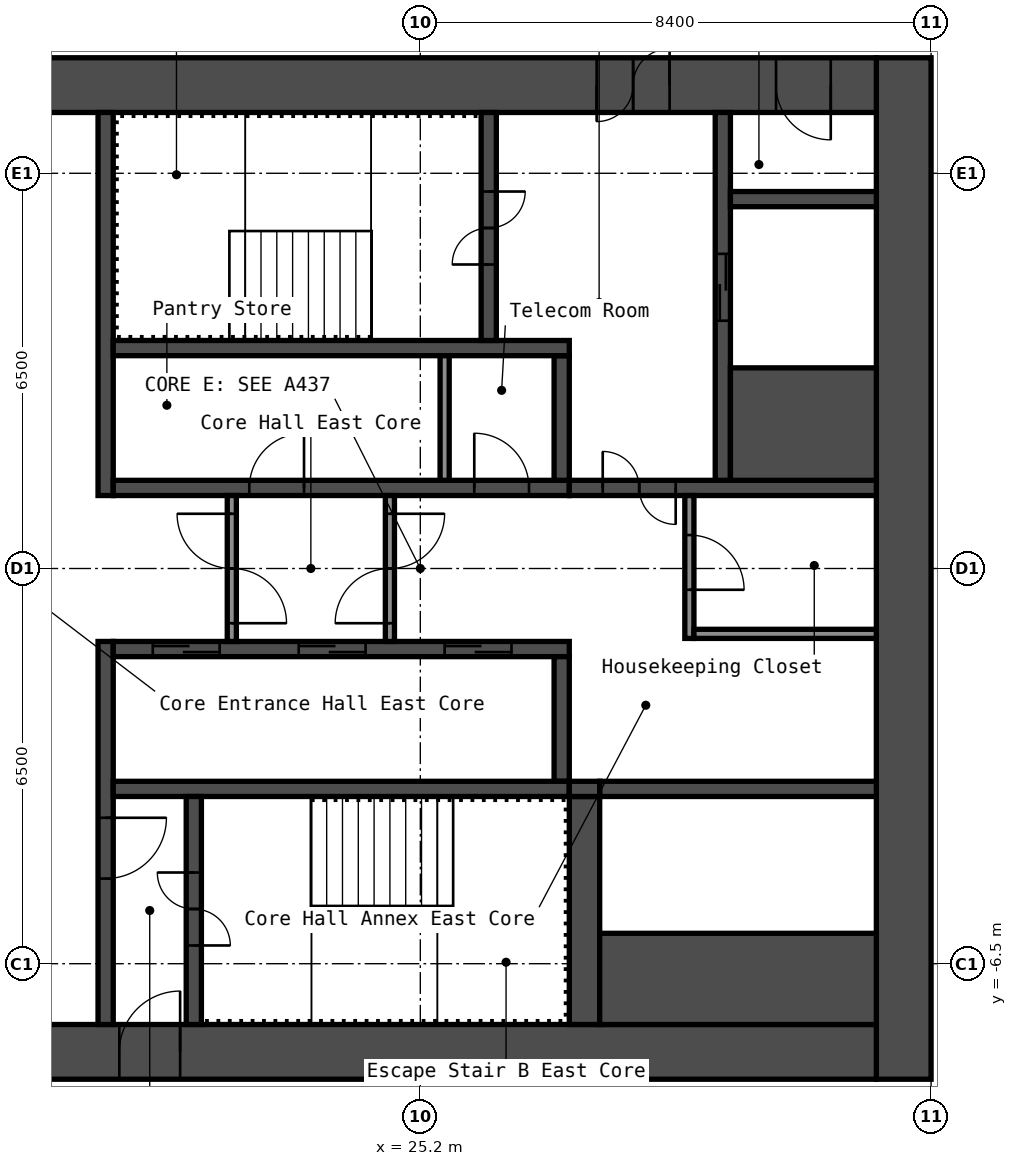
"""IFC4 building model, lengths in metres.
Left out: names, types, materials, properties, quantities, classifications, styles, units other than length and angle.
Written with IfcOpenShell. Run it as: python <this file> out.ifc"""

import sys

from ifc_helpers import new_model, si_unit, direction, frame, frame_2d, origin, place, context, subcontext, project, spatial, rectangle, extrude, element, fill, save


model = new_model("IFC4")
c1 = context("Model", 3, precision=1e-05, world=origin(), true_north=direction((0.0, 1.0)))
c2 = subcontext(c1, "Body", "Model", "MODEL_VIEW")
j1 = project(units=[si_unit("LENGTHUNIT", "METRE"), si_unit("PLANEANGLEUNIT", "RADIAN")], contexts=[c1])
p1 = place(None, origin())
s1 = spatial("IfcSite", under=j1, at=p1, CompositionType="ELEMENT")
p2 = place(p1, origin())
s2 = spatial("IfcBuilding", under=s1, at=p2, CompositionType="ELEMENT")
p3 = place(p2, frame((0.0, 0.0, 258.2)))
s3 = spatial("IfcBuildingStorey", under=s2, at=p3, CompositionType="ELEMENT", Elevation=258.2)
p4 = place(p3, frame((33.15, -8.4, 0.0), z_axis=(0.0, 0.0, 1.0), x_axis=(0.0, 1.0, 0.0)))
e1 = element("IfcWall", 1, at=p4, inside=s3, PredefinedType="SHEAR", context=c2, shape_type="SweptSolid", body=[
    extrude(rectangle(XDim=16.8, YDim=0.9, at=frame_2d((8.4, 0.0))), origin(), (0.0, 0.0, 1.0), 2.75),
])
p5 = place(p3, frame((17.7, 7.95, 0.0), z_axis=(0.0, 0.0, 1.0), x_axis=(1.0, 0.0, 0.0)))
e2 = element("IfcWall", 2, at=p5, inside=s3, PredefinedType="SHEAR", context=c2, shape_type="SweptSolid", body=[
    extrude(rectangle(XDim=15.0, YDim=0.9, at=frame_2d((7.5, 0.0))), origin(), (0.0, 0.0, 1.0), 2.75),
])
p6 = place(p5, frame((10.4, 0.0, 0.0)))
e3 = element("IfcOpeningElement", 3, at=p6, cuts=e2, PredefinedType="OPENING", context=c2, shape_type="SweptSolid", body=[
    extrude(rectangle(XDim=1.2, YDim=2.1, at=frame_2d((0.6, 1.05))), frame((0.0, 0.46, 0.0), z_axis=(0.0, -1.0, 0.0), x_axis=(1.0, 0.0, 0.0)), (0.0, 0.0, 1.0), 0.92),
])
p7 = place(p5, frame((13.35, 0.0, 0.0)))
e4 = element("IfcOpeningElement", 4, at=p7, cuts=e2, PredefinedType="OPENING", context=c2, shape_type="SweptSolid", body=[
    extrude(rectangle(XDim=0.9, YDim=2.1, at=frame_2d((0.45, 1.05))), frame((0.0, 0.46, 0.0), z_axis=(0.0, -1.0, 0.0), x_axis=(1.0, 0.0, 0.0)), (0.0, 0.0, 1.0), 0.92),
])
p8 = place(p3, frame((17.7, -7.95, 0.0), z_axis=(0.0, 0.0, 1.0), x_axis=(1.0, 0.0, 0.0)))
e5 = element("IfcWall", 5, at=p8, inside=s3, PredefinedType="SHEAR", context=c2, shape_type="SweptSolid", body=[
    extrude(rectangle(XDim=15.0, YDim=0.9, at=frame_2d((7.5, 0.0))), origin(), (0.0, 0.0, 1.0), 2.75),
])
p9 = place(p8, frame((2.55, 0.0, 0.0)))
e6 = element("IfcOpeningElement", 6, at=p9, cuts=e5, PredefinedType="OPENING", context=c2, shape_type="SweptSolid", body=[
    extrude(rectangle(XDim=1.0, YDim=2.1, at=frame_2d((0.5, 1.05))), frame((0.0, 0.46, 0.0), z_axis=(0.0, -1.0, 0.0), x_axis=(1.0, 0.0, 0.0)), (0.0, 0.0, 1.0), 0.92),
])
p10 = place(p3, frame((20.025, 1.2, 0.0), z_axis=(0.0, 0.0, 1.0), x_axis=(0.0, 1.0, 0.0)))
e7 = element("IfcWall", 7, at=p10, inside=s3, PredefinedType="SHEAR", context=c2, shape_type="SweptSolid", body=[
    extrude(rectangle(XDim=6.3, YDim=0.25, at=frame_2d((3.15, 0.0))), origin(), (0.0, 0.0, 1.0), 2.75),
])
p11 = place(p3, frame((20.025, -7.5, 0.0), z_axis=(0.0, 0.0, 1.0), x_axis=(0.0, 1.0, 0.0)))
e8 = element("IfcWall", 8, at=p11, inside=s3, PredefinedType="SHEAR", context=c2, shape_type="SweptSolid", body=[
    extrude(rectangle(XDim=6.3, YDim=0.25, at=frame_2d((3.15, 0.0))), origin(), (0.0, 0.0, 1.0), 2.75),
])
p12 = place(p11, frame((2.4, 0.0, 0.0)))
e9 = element("IfcOpeningElement", 9, at=p12, cuts=e8, PredefinedType="OPENING", context=c2, shape_type="SweptSolid", body=[
    extrude(rectangle(XDim=1.0, YDim=2.1, at=frame_2d((0.5, 1.05))), frame((0.0, 0.135, 0.0), z_axis=(0.0, -1.0, 0.0), x_axis=(1.0, 0.0, 0.0)), (0.0, 0.0, 1.0), 0.27),
])
p13 = place(p3, frame((20.15, 1.325, 0.0), z_axis=(0.0, 0.0, 1.0), x_axis=(1.0, 0.0, 0.0)))
e10 = element("IfcWall", 10, at=p13, inside=s3, PredefinedType="SHEAR", context=c2, shape_type="SweptSolid", body=[
    extrude(rectangle(XDim=7.5, YDim=0.25, at=frame_2d((3.75, 0.0))), origin(), (0.0, 0.0, 1.0), 2.75),
])
p14 = place(p13, frame((2.238, 0.0, 0.0)))
e11 = element("IfcOpeningElement", 11, at=p14, cuts=e10, PredefinedType="OPENING", context=c2, shape_type="SweptSolid", body=[
    extrude(rectangle(XDim=0.9, YDim=2.1, at=frame_2d((0.45, 1.05))), frame((0.0, 0.135, 0.0), z_axis=(0.0, -1.0, 0.0), x_axis=(1.0, 0.0, 0.0)), (0.0, 0.0, 1.0), 0.27),
])
p15 = place(p13, frame((5.938, 0.0, 0.0)))
e12 = element("IfcOpeningElement", 12, at=p15, cuts=e10, PredefinedType="OPENING", context=c2, shape_type="SweptSolid", body=[
    extrude(rectangle(XDim=0.9, YDim=2.1, at=frame_2d((0.45, 1.05))), frame((0.0, 0.135, 0.0), z_axis=(0.0, -1.0, 0.0), x_axis=(1.0, 0.0, 0.0)), (0.0, 0.0, 1.0), 0.27),
])
p16 = place(p3, frame((27.525, 1.45, 0.0), z_axis=(0.0, 0.0, 1.0), x_axis=(0.0, 1.0, 0.0)))
e13 = element("IfcWall", 13, at=p16, inside=s3, PredefinedType="SHEAR", context=c2, shape_type="SweptSolid", body=[
    extrude(rectangle(XDim=2.05, YDim=0.25, at=frame_2d((1.025, 0.0))), origin(), (0.0, 0.0, 1.0), 2.75),
])
p17 = place(p3, frame((20.15, 3.625, 0.0), z_axis=(0.0, 0.0, 1.0), x_axis=(1.0, 0.0, 0.0)))
e14 = element("IfcWall", 14, at=p17, inside=s3, PredefinedType="SHEAR", context=c2, shape_type="SweptSolid", body=[
    extrude(rectangle(XDim=7.5, YDim=0.25, at=frame_2d((3.75, 0.0))), origin(), (0.0, 0.0, 1.0), 2.75),
])
p18 = place(p3, frame((26.325, 3.75, 0.0), z_axis=(0.0, 0.0, 1.0), x_axis=(0.0, 1.0, 0.0)))
e15 = element("IfcWall", 15, at=p18, inside=s3, PredefinedType="SHEAR", context=c2, shape_type="SweptSolid", body=[
    extrude(rectangle(XDim=3.75, YDim=0.25, at=frame_2d((1.875, 0.0))), origin(), (0.0, 0.0, 1.0), 2.75),
])
p19 = place(p18, frame((1.25, 0.0, 0.0)))
e16 = element("IfcOpeningElement", 16, at=p19, cuts=e15, PredefinedType="OPENING", context=c2, shape_type="SweptSolid", body=[
    extrude(rectangle(XDim=1.2, YDim=2.1, at=frame_2d((0.6, 1.05))), frame((0.0, 0.135, 0.0), z_axis=(0.0, -1.0, 0.0), x_axis=(1.0, 0.0, 0.0)), (0.0, 0.0, 1.0), 0.27),
])
p20 = place(p3, frame((27.65, 1.325, 0.0), z_axis=(0.0, 0.0, 1.0), x_axis=(1.0, 0.0, 0.0)))
e17 = element("IfcWall", 17, at=p20, inside=s3, PredefinedType="SHEAR", context=c2, shape_type="SweptSolid", body=[
    extrude(rectangle(XDim=5.05, YDim=0.25, at=frame_2d((2.525, 0.0))), origin(), (0.0, 0.0, 1.0), 2.75),
])
p21 = place(p20, frame((0.55, 0.0, 0.0)))
e18 = element("IfcOpeningElement", 18, at=p21, cuts=e17, PredefinedType="OPENING", context=c2, shape_type="SweptSolid", body=[
    extrude(rectangle(XDim=1.2, YDim=2.1, at=frame_2d((0.6, 1.05))), frame((0.0, 0.135, 0.0), z_axis=(0.0, -1.0, 0.0), x_axis=(1.0, 0.0, 0.0)), (0.0, 0.0, 1.0), 0.27),
])
p22 = place(p3, frame((30.175, 1.45, 0.0), z_axis=(0.0, 0.0, 1.0), x_axis=(0.0, 1.0, 0.0)))
e19 = element("IfcWall", 19, at=p22, inside=s3, PredefinedType="SHEAR", context=c2, shape_type="SweptSolid", body=[
    extrude(rectangle(XDim=6.05, YDim=0.25, at=frame_2d((3.025, 0.0))), origin(), (0.0, 0.0, 1.0), 2.75),
])
p23 = place(p22, frame((2.625, 0.0, 0.0)))
e20 = element("IfcOpeningElement", 20, at=p23, cuts=e19, PredefinedType="OPENING", context=c2, shape_type="SweptSolid", body=[
    extrude(rectangle(XDim=1.1, YDim=2.1, at=frame_2d((0.55, 1.05))), frame((0.0, 0.135, 0.0), z_axis=(0.0, -1.0, 0.0), x_axis=(1.0, 0.0, 0.0)), (0.0, 0.0, 1.0), 0.27),
])
p24 = place(p3, frame((30.3, 2.375, 0.0), z_axis=(0.0, 0.0, 1.0), x_axis=(1.0, 0.0, 0.0)))
e21 = element("IfcWall", 21, at=p24, inside=s3, PredefinedType="SHEAR", context=c2, shape_type="SweptSolid", body=[
    extrude(rectangle(XDim=2.4, YDim=1.85, at=frame_2d((1.2, 0.0))), origin(), (0.0, 0.0, 1.0), 2.75),
])
p25 = place(p3, frame((30.3, 6.075, 0.0), z_axis=(0.0, 0.0, 1.0), x_axis=(1.0, 0.0, 0.0)))
e22 = element("IfcWall", 22, at=p25, inside=s3, PredefinedType="SHEAR", context=c2, shape_type="SweptSolid", body=[
    extrude(rectangle(XDim=2.4, YDim=0.25, at=frame_2d((1.2, 0.0))), origin(), (0.0, 0.0, 1.0), 2.75),
])
p26 = place(p3, frame((20.15, -1.325, 0.0), z_axis=(0.0, 0.0, 1.0), x_axis=(1.0, 0.0, 0.0)))
e23 = element("IfcWall", 23, at=p26, inside=s3, PredefinedType="SHEAR", context=c2, shape_type="SweptSolid", body=[
    extrude(rectangle(XDim=7.5, YDim=0.25, at=frame_2d((3.75, 0.0))), origin(), (0.0, 0.0, 1.0), 2.75),
])
p27 = place(p26, frame((0.65, 0.0, 0.0)))
e24 = element("IfcOpeningElement", 24, at=p27, cuts=e23, PredefinedType="OPENING", context=c2, shape_type="SweptSolid", body=[
    extrude(rectangle(XDim=1.1, YDim=2.1, at=frame_2d((0.55, 1.05))), frame((0.0, 0.135, 0.0), z_axis=(0.0, -1.0, 0.0), x_axis=(1.0, 0.0, 0.0)), (0.0, 0.0, 1.0), 0.27),
])
p28 = place(p26, frame((3.05, 0.0, 0.0)))
e25 = element("IfcOpeningElement", 25, at=p28, cuts=e23, PredefinedType="OPENING", context=c2, shape_type="SweptSolid", body=[
    extrude(rectangle(XDim=1.1, YDim=2.1, at=frame_2d((0.55, 1.05))), frame((0.0, 0.135, 0.0), z_axis=(0.0, -1.0, 0.0), x_axis=(1.0, 0.0, 0.0)), (0.0, 0.0, 1.0), 0.27),
])
p29 = place(p26, frame((5.45, 0.0, 0.0)))
e26 = element("IfcOpeningElement", 26, at=p29, cuts=e23, PredefinedType="OPENING", context=c2, shape_type="SweptSolid", body=[
    extrude(rectangle(XDim=1.1, YDim=2.1, at=frame_2d((0.55, 1.05))), frame((0.0, 0.135, 0.0), z_axis=(0.0, -1.0, 0.0), x_axis=(1.0, 0.0, 0.0)), (0.0, 0.0, 1.0), 0.27),
])
p30 = place(p3, frame((27.525, -3.5, 0.0), z_axis=(0.0, 0.0, 1.0), x_axis=(0.0, 1.0, 0.0)))
e27 = element("IfcWall", 27, at=p30, inside=s3, PredefinedType="SHEAR", context=c2, shape_type="SweptSolid", body=[
    extrude(rectangle(XDim=2.05, YDim=0.25, at=frame_2d((1.025, 0.0))), origin(), (0.0, 0.0, 1.0), 2.75),
])
p31 = place(p3, frame((20.15, -3.625, 0.0), z_axis=(0.0, 0.0, 1.0), x_axis=(1.0, 0.0, 0.0)))
e28 = element("IfcWall", 28, at=p31, inside=s3, PredefinedType="SHEAR", context=c2, shape_type="SweptSolid", body=[
    extrude(rectangle(XDim=7.5, YDim=0.25, at=frame_2d((3.75, 0.0))), origin(), (0.0, 0.0, 1.0), 2.75),
])
p32 = place(p3, frame((21.475, -7.5, 0.0), z_axis=(0.0, 0.0, 1.0), x_axis=(0.0, 1.0, 0.0)))
e29 = element("IfcWall", 29, at=p32, inside=s3, PredefinedType="SHEAR", context=c2, shape_type="SweptSolid", body=[
    extrude(rectangle(XDim=3.75, YDim=0.25, at=frame_2d((1.875, 0.0))), origin(), (0.0, 0.0, 1.0), 2.75),
])
p33 = place(p32, frame((1.3, 0.0, 0.0)))
e30 = element("IfcOpeningElement", 30, at=p33, cuts=e29, PredefinedType="OPENING", context=c2, shape_type="SweptSolid", body=[
    extrude(rectangle(XDim=1.2, YDim=2.1, at=frame_2d((0.6, 1.05))), frame((0.0, 0.135, 0.0), z_axis=(0.0, -1.0, 0.0), x_axis=(1.0, 0.0, 0.0)), (0.0, 0.0, 1.0), 0.27),
])
p34 = place(p3, frame((27.9, -7.5, 0.0), z_axis=(0.0, 0.0, 1.0), x_axis=(0.0, 1.0, 0.0)))
e31 = element("IfcWall", 31, at=p34, inside=s3, PredefinedType="SHEAR", context=c2, shape_type="SweptSolid", body=[
    extrude(rectangle(XDim=3.75, YDim=0.5, at=frame_2d((1.875, 0.0))), origin(), (0.0, 0.0, 1.0), 2.75),
])
p35 = place(p3, frame((28.15, -3.625, 0.0), z_axis=(0.0, 0.0, 1.0), x_axis=(1.0, 0.0, 0.0)))
e32 = element("IfcWall", 32, at=p35, inside=s3, PredefinedType="SHEAR", context=c2, shape_type="SweptSolid", body=[
    extrude(rectangle(XDim=4.55, YDim=0.25, at=frame_2d((2.275, 0.0))), origin(), (0.0, 0.0, 1.0), 2.75),
])
p36 = place(p3, frame((28.15, -6.75, 0.0), z_axis=(0.0, 0.0, 1.0), x_axis=(1.0, 0.0, 0.0)))
e33 = element("IfcWall", 33, at=p36, inside=s3, PredefinedType="SHEAR", context=c2, shape_type="SweptSolid", body=[
    extrude(rectangle(XDim=4.55, YDim=1.5, at=frame_2d((2.275, 0.0))), origin(), (0.0, 0.0, 1.0), 2.75),
])
p37 = place(p3, frame((27.65, -3.625, 0.0), z_axis=(0.0, 0.0, 1.0), x_axis=(1.0, 0.0, 0.0)))
e34 = element("IfcWall", 34, at=p37, inside=s3, PredefinedType="SHEAR", context=c2, shape_type="SweptSolid", body=[
    extrude(rectangle(XDim=0.5, YDim=0.25, at=frame_2d((0.25, 0.0))), origin(), (0.0, 0.0, 1.0), 2.75),
])
p38 = place(p3, frame((22.1, -1.2, 0.0), z_axis=(0.0, 0.0, 1.0), x_axis=(0.0, 1.0, 0.0)))
e35 = element("IfcWall", 35, at=p38, inside=s3, PredefinedType="PARTITIONING", context=c2, shape_type="SweptSolid", body=[
    extrude(rectangle(XDim=2.4, YDim=0.15, at=frame_2d((1.2, 0.0))), origin(), (0.0, 0.0, 1.0), 2.75),
])
p39 = place(p38, frame((0.3, 0.0, 0.0)))
e36 = element("IfcOpeningElement", 36, at=p39, cuts=e35, PredefinedType="OPENING", context=c2, shape_type="SweptSolid", body=[
    extrude(rectangle(XDim=1.8, YDim=2.1, at=frame_2d((0.9, 1.05))), frame((0.0, 0.085, 0.0), z_axis=(0.0, -1.0, 0.0), x_axis=(1.0, 0.0, 0.0)), (0.0, 0.0, 1.0), 0.17),
])
p40 = place(p3, frame((24.7, -1.2, 0.0), z_axis=(0.0, 0.0, 1.0), x_axis=(0.0, 1.0, 0.0)))
e37 = element("IfcWall", 37, at=p40, inside=s3, PredefinedType="PARTITIONING", context=c2, shape_type="SweptSolid", body=[
    extrude(rectangle(XDim=2.4, YDim=0.15, at=frame_2d((1.2, 0.0))), origin(), (0.0, 0.0, 1.0), 2.75),
])
p41 = place(p40, frame((0.3, 0.0, 0.0)))
e38 = element("IfcOpeningElement", 38, at=p41, cuts=e37, PredefinedType="OPENING", context=c2, shape_type="SweptSolid", body=[
    extrude(rectangle(XDim=1.8, YDim=2.1, at=frame_2d((0.9, 1.05))), frame((0.0, 0.085, 0.0), z_axis=(0.0, -1.0, 0.0), x_axis=(1.0, 0.0, 0.0)), (0.0, 0.0, 1.0), 0.17),
])
p42 = place(p3, frame((29.625, -1.15, 0.0), z_axis=(0.0, 0.0, 1.0), x_axis=(0.0, 1.0, 0.0)))
e39 = element("IfcWall", 39, at=p42, inside=s3, PredefinedType="PARTITIONING", context=c2, shape_type="SweptSolid", body=[
    extrude(rectangle(XDim=2.35, YDim=0.15, at=frame_2d((1.175, 0.0))), origin(), (0.0, 0.0, 1.0), 2.75),
])
p43 = place(p42, frame((0.8, 0.0, 0.0)))
e40 = element("IfcOpeningElement", 40, at=p43, cuts=e39, PredefinedType="OPENING", context=c2, shape_type="SweptSolid", body=[
    extrude(rectangle(XDim=0.9, YDim=2.1, at=frame_2d((0.45, 1.05))), frame((0.0, 0.085, 0.0), z_axis=(0.0, -1.0, 0.0), x_axis=(1.0, 0.0, 0.0)), (0.0, 0.0, 1.0), 0.17),
])
p44 = place(p3, frame((29.7, -1.075, 0.0), z_axis=(0.0, 0.0, 1.0), x_axis=(1.0, 0.0, 0.0)))
e41 = element("IfcWall", 41, at=p44, inside=s3, PredefinedType="PARTITIONING", context=c2, shape_type="SweptSolid", body=[
    extrude(rectangle(XDim=3.0, YDim=0.15, at=frame_2d((1.5, 0.0))), origin(), (0.0, 0.0, 1.0), 2.75),
])
p45 = place(p3, frame((25.6, 1.45, 0.0), z_axis=(0.0, 0.0, 1.0), x_axis=(0.0, 1.0, 0.0)))
e42 = element("IfcWall", 42, at=p45, inside=s3, PredefinedType="PARTITIONING", context=c2, shape_type="SweptSolid", body=[
    extrude(rectangle(XDim=2.05, YDim=0.15, at=frame_2d((1.025, 0.0))), origin(), (0.0, 0.0, 1.0), 2.75),
])
p46 = place(p6, origin())
e43 = element("IfcDoor", 43, at=p46, inside=s3, OperationType="DOUBLE_DOOR_SINGLE_SWING", PredefinedType="DOOR", context=c2, shape_type="SweptSolid", body=[
    extrude(rectangle(XDim=1.2, YDim=2.1, at=frame_2d((0.6, 1.05))), frame((0.0, 0.025, 0.0), z_axis=(0.0, -1.0, 0.0), x_axis=(1.0, 0.0, 0.0)), (0.0, 0.0, 1.0), 0.05),
])
fill(e3, e43)
p47 = place(p7, origin())
e44 = element("IfcDoor", 44, at=p47, inside=s3, OperationType="SINGLE_SWING_RIGHT", PredefinedType="DOOR", context=c2, shape_type="SweptSolid", body=[
    extrude(rectangle(XDim=0.9, YDim=2.1, at=frame_2d((0.45, 1.05))), frame((0.0, 0.025, 0.0), z_axis=(0.0, -1.0, 0.0), x_axis=(1.0, 0.0, 0.0)), (0.0, 0.0, 1.0), 0.05),
])
fill(e4, e44)
p48 = place(p9, origin())
e45 = element("IfcDoor", 45, at=p48, inside=s3, OperationType="SINGLE_SWING_LEFT", PredefinedType="DOOR", context=c2, shape_type="SweptSolid", body=[
    extrude(rectangle(XDim=1.0, YDim=2.1, at=frame_2d((0.5, 1.05))), frame((0.0, 0.025, 0.0), z_axis=(0.0, -1.0, 0.0), x_axis=(1.0, 0.0, 0.0)), (0.0, 0.0, 1.0), 0.05),
])
fill(e6, e45)
p49 = place(p19, origin())
e46 = element("IfcDoor", 46, at=p49, inside=s3, OperationType="DOUBLE_DOOR_SINGLE_SWING", PredefinedType="DOOR", context=c2, shape_type="SweptSolid", body=[
    extrude(rectangle(XDim=1.2, YDim=2.1, at=frame_2d((0.6, 1.05))), frame((0.0, 0.025, 0.0), z_axis=(0.0, -1.0, 0.0), x_axis=(1.0, 0.0, 0.0)), (0.0, 0.0, 1.0), 0.05),
])
fill(e16, e46)
p50 = place(p33, origin())
e47 = element("IfcDoor", 47, at=p50, inside=s3, OperationType="DOUBLE_DOOR_SINGLE_SWING", PredefinedType="DOOR", context=c2, shape_type="SweptSolid", body=[
    extrude(rectangle(XDim=1.2, YDim=2.1, at=frame_2d((0.6, 1.05))), frame((0.0, 0.025, 0.0), z_axis=(0.0, -1.0, 0.0), x_axis=(1.0, 0.0, 0.0)), (0.0, 0.0, 1.0), 0.05),
])
fill(e30, e47)
p51 = place(p12, origin())
e48 = element("IfcDoor", 48, at=p51, inside=s3, OperationType="SINGLE_SWING_RIGHT", PredefinedType="DOOR", context=c2, shape_type="SweptSolid", body=[
    extrude(rectangle(XDim=1.0, YDim=2.1, at=frame_2d((0.5, 1.05))), frame((0.0, 0.025, 0.0), z_axis=(0.0, -1.0, 0.0), x_axis=(1.0, 0.0, 0.0)), (0.0, 0.0, 1.0), 0.05),
])
fill(e9, e48)
p52 = place(p21, origin())
e49 = element("IfcDoor", 49, at=p52, inside=s3, OperationType="DOUBLE_DOOR_SINGLE_SWING", PredefinedType="DOOR", context=c2, shape_type="SweptSolid", body=[
    extrude(rectangle(XDim=1.2, YDim=2.1, at=frame_2d((0.6, 1.05))), frame((0.0, 0.025, 0.0), z_axis=(0.0, -1.0, 0.0), x_axis=(1.0, 0.0, 0.0)), (0.0, 0.0, 1.0), 0.05),
])
fill(e18, e49)
p53 = place(p39, origin())
e50 = element("IfcDoor", 50, at=p53, inside=s3, OperationType="DOUBLE_DOOR_SINGLE_SWING", PredefinedType="DOOR", context=c2, shape_type="SweptSolid", body=[
    extrude(rectangle(XDim=1.8, YDim=2.1, at=frame_2d((0.9, 1.05))), frame((0.0, 0.025, 0.0), z_axis=(0.0, -1.0, 0.0), x_axis=(1.0, 0.0, 0.0)), (0.0, 0.0, 1.0), 0.05),
])
fill(e36, e50)
p54 = place(p41, origin())
e51 = element("IfcDoor", 51, at=p54, inside=s3, OperationType="DOUBLE_DOOR_SINGLE_SWING", PredefinedType="DOOR", context=c2, shape_type="SweptSolid", body=[
    extrude(rectangle(XDim=1.8, YDim=2.1, at=frame_2d((0.9, 1.05))), frame((0.0, 0.025, 0.0), z_axis=(0.0, -1.0, 0.0), x_axis=(1.0, 0.0, 0.0)), (0.0, 0.0, 1.0), 0.05),
])
fill(e38, e51)
p55 = place(p43, origin())
e52 = element("IfcDoor", 52, at=p55, inside=s3, OperationType="SINGLE_SWING_LEFT", PredefinedType="DOOR", context=c2, shape_type="SweptSolid", body=[
    extrude(rectangle(XDim=0.9, YDim=2.1, at=frame_2d((0.45, 1.05))), frame((0.0, 0.025, 0.0), z_axis=(0.0, -1.0, 0.0), x_axis=(1.0, 0.0, 0.0)), (0.0, 0.0, 1.0), 0.05),
])
fill(e40, e52)
p56 = place(p14, origin())
e53 = element("IfcDoor", 53, at=p56, inside=s3, OperationType="SINGLE_SWING_LEFT", PredefinedType="DOOR", context=c2, shape_type="SweptSolid", body=[
    extrude(rectangle(XDim=0.9, YDim=2.1, at=frame_2d((0.45, 1.05))), frame((0.0, 0.025, 0.0), z_axis=(0.0, -1.0, 0.0), x_axis=(1.0, 0.0, 0.0)), (0.0, 0.0, 1.0), 0.05),
])
fill(e11, e53)
p57 = place(p15, origin())
e54 = element("IfcDoor", 54, at=p57, inside=s3, OperationType="SINGLE_SWING_RIGHT", PredefinedType="DOOR", context=c2, shape_type="SweptSolid", body=[
    extrude(rectangle(XDim=0.9, YDim=2.1, at=frame_2d((0.45, 1.05))), frame((0.0, 0.025, 0.0), z_axis=(0.0, -1.0, 0.0), x_axis=(1.0, 0.0, 0.0)), (0.0, 0.0, 1.0), 0.05),
])
fill(e12, e54)
p58 = place(p27, origin())
e55 = element("IfcDoor", 55, at=p58, inside=s3, OperationType="DOUBLE_DOOR_SLIDING", PredefinedType="DOOR", context=c2, shape_type="SweptSolid", body=[
    extrude(rectangle(XDim=1.1, YDim=2.1, at=frame_2d((0.55, 1.05))), frame((0.0, 0.025, 0.0), z_axis=(0.0, -1.0, 0.0), x_axis=(1.0, 0.0, 0.0)), (0.0, 0.0, 1.0), 0.05),
])
fill(e24, e55)
p59 = place(p28, origin())
e56 = element("IfcDoor", 56, at=p59, inside=s3, OperationType="DOUBLE_DOOR_SLIDING", PredefinedType="DOOR", context=c2, shape_type="SweptSolid", body=[
    extrude(rectangle(XDim=1.1, YDim=2.1, at=frame_2d((0.55, 1.05))), frame((0.0, 0.025, 0.0), z_axis=(0.0, -1.0, 0.0), x_axis=(1.0, 0.0, 0.0)), (0.0, 0.0, 1.0), 0.05),
])
fill(e25, e56)
p60 = place(p29, origin())
e57 = element("IfcDoor", 57, at=p60, inside=s3, OperationType="DOUBLE_DOOR_SLIDING", PredefinedType="DOOR", context=c2, shape_type="SweptSolid", body=[
    extrude(rectangle(XDim=1.1, YDim=2.1, at=frame_2d((0.55, 1.05))), frame((0.0, 0.025, 0.0), z_axis=(0.0, -1.0, 0.0), x_axis=(1.0, 0.0, 0.0)), (0.0, 0.0, 1.0), 0.05),
])
fill(e26, e57)
p61 = place(p23, origin())
e58 = element("IfcDoor", 58, at=p61, inside=s3, OperationType="DOUBLE_DOOR_SLIDING", PredefinedType="DOOR", context=c2, shape_type="SweptSolid", body=[
    extrude(rectangle(XDim=1.1, YDim=2.1, at=frame_2d((0.55, 1.05))), frame((0.0, 0.025, 0.0), z_axis=(0.0, -1.0, 0.0), x_axis=(1.0, 0.0, 0.0)), (0.0, 0.0, 1.0), 0.05),
])
fill(e20, e58)
save(model, sys.argv[1])
